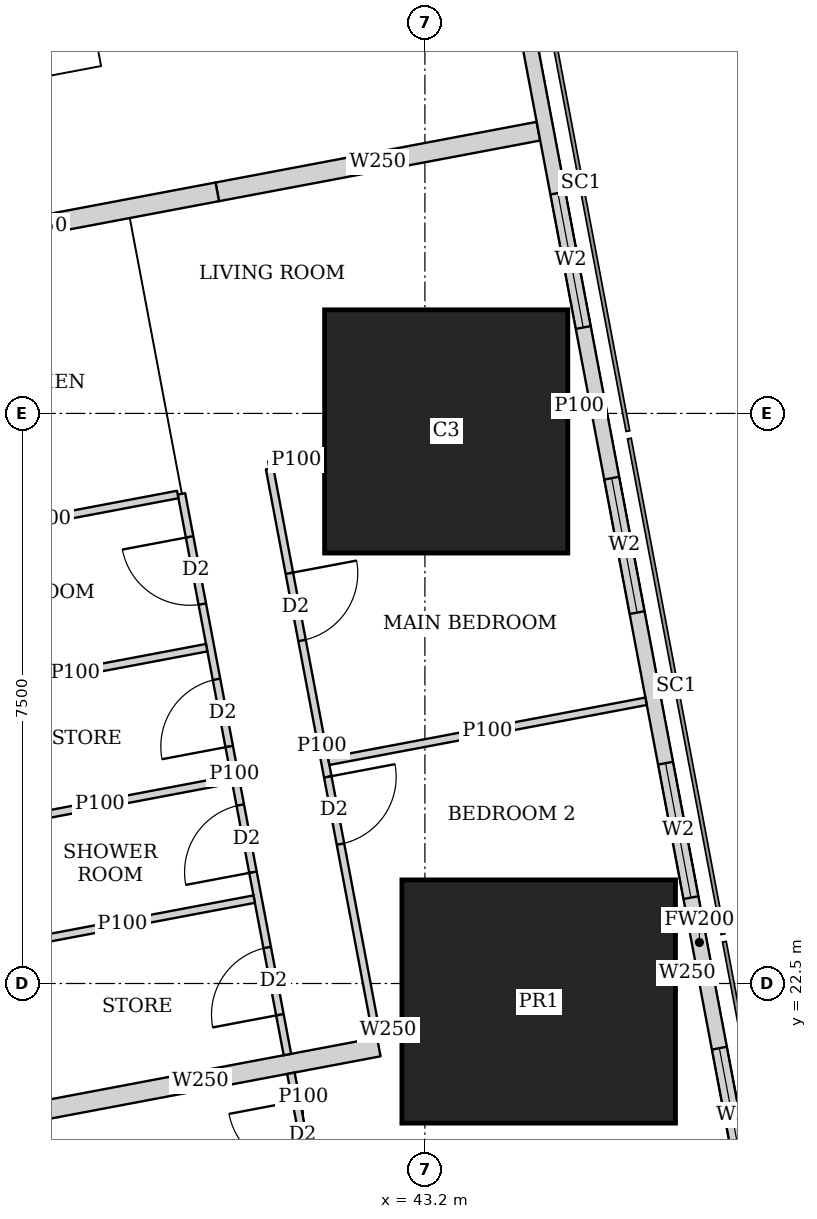
"""IFC4 building model, lengths in metres.
Left out: names, types, materials, properties, quantities, classifications, styles, units other than length and angle.
Written with IfcOpenShell. Run it as: python <this file> out.ifc"""

import sys

from ifc_helpers import new_model, si_unit, direction, frame, frame_2d, origin, origin_2d, place, context, subcontext, project, spatial, rectangle, extrude, element, fill, save


model = new_model("IFC4")
c1 = context("Model", 3, precision=1e-05, world=origin(), true_north=direction((0.0, 1.0)))
c2 = subcontext(c1, "Body", "Model", "MODEL_VIEW")
j1 = project(units=[si_unit("LENGTHUNIT", "METRE"), si_unit("PLANEANGLEUNIT", "RADIAN")], contexts=[c1])
p1 = place(None, origin())
s1 = spatial("IfcSite", under=j1, at=p1, CompositionType="ELEMENT")
p2 = place(p1, origin())
s2 = spatial("IfcBuilding", under=s1, at=p2, CompositionType="ELEMENT")
p3 = place(p2, frame((0.0, 0.0, 23.75)))
s3 = spatial("IfcBuildingStorey", under=s2, at=p3, CompositionType="ELEMENT", Elevation=23.75)
p4 = place(p3, frame((44.697, 22.263, 0.0), z_axis=(0.0, 0.0, 1.0), x_axis=(1.0, 0.0, 0.0)))
e1 = element("IfcColumn", 1, at=p4, inside=s3, PredefinedType="COLUMN", context=c2, shape_type="SweptSolid", body=[
    extrude(rectangle(XDim=3.6, YDim=3.2, at=origin_2d()), origin(), (0.0, 0.0, 1.0), 3.75),
])
p5 = place(p3, frame((43.48, 29.763, 0.0), z_axis=(0.0, 0.0, 1.0), x_axis=(1.0, 0.0, 0.0)))
e2 = element("IfcColumn", 2, at=p5, inside=s3, PredefinedType="COLUMN", context=c2, shape_type="SweptSolid", body=[
    extrude(rectangle(XDim=3.2, YDim=3.2, at=origin_2d()), origin(), (0.0, 0.0, 1.0), 3.75),
])
p6 = place(p3, frame((50.653, 2.703, 0.0), z_axis=(0.0, 0.0, 1.0), x_axis=(-0.185612026696, 0.982623109613, 0.0)))
e3 = element("IfcWall", 3, at=p6, inside=s3, PredefinedType="SOLIDWALL", context=c2, shape_type="SweptSolid", body=[
    extrude(rectangle(XDim=41.393, YDim=0.2, at=frame_2d((20.697, 0.0))), origin(), (0.0, 0.0, 1.0), 3.5),
])
p7 = place(p6, frame((1.633, 0.0, 0.9)))
e4 = element("IfcOpeningElement", 4, at=p7, cuts=e3, PredefinedType="OPENING", context=c2, shape_type="SweptSolid", body=[
    extrude(rectangle(XDim=1.8, YDim=1.5, at=frame_2d((0.9, 0.75))), frame((0.0, 0.11, 0.0), z_axis=(0.0, -1.0, 0.0), x_axis=(1.0, 0.0, 0.0)), (0.0, 0.0, 1.0), 0.22),
])
p8 = place(p6, frame((6.032, 0.0, 0.9)))
e5 = element("IfcOpeningElement", 5, at=p8, cuts=e3, PredefinedType="OPENING", context=c2, shape_type="SweptSolid", body=[
    extrude(rectangle(XDim=1.8, YDim=1.5, at=frame_2d((0.9, 0.75))), frame((0.0, 0.11, 0.0), z_axis=(0.0, -1.0, 0.0), x_axis=(1.0, 0.0, 0.0)), (0.0, 0.0, 1.0), 0.22),
])
p9 = place(p6, frame((9.848, 0.0, 0.9)))
e6 = element("IfcOpeningElement", 6, at=p9, cuts=e3, PredefinedType="OPENING", context=c2, shape_type="SweptSolid", body=[
    extrude(rectangle(XDim=1.8, YDim=1.5, at=frame_2d((0.9, 0.75))), frame((0.0, 0.11, 0.0), z_axis=(0.0, -1.0, 0.0), x_axis=(1.0, 0.0, 0.0)), (0.0, 0.0, 1.0), 0.22),
])
p10 = place(p6, frame((17.481, 0.0, 0.9)))
e7 = element("IfcOpeningElement", 7, at=p10, cuts=e3, PredefinedType="OPENING", context=c2, shape_type="SweptSolid", body=[
    extrude(rectangle(XDim=1.8, YDim=1.5, at=frame_2d((0.9, 0.75))), frame((0.0, 0.11, 0.0), z_axis=(0.0, -1.0, 0.0), x_axis=(1.0, 0.0, 0.0)), (0.0, 0.0, 1.0), 0.22),
])
p11 = place(p6, frame((21.297, 0.0, 0.9)))
e8 = element("IfcOpeningElement", 8, at=p11, cuts=e3, PredefinedType="OPENING", context=c2, shape_type="SweptSolid", body=[
    extrude(rectangle(XDim=1.8, YDim=1.5, at=frame_2d((0.9, 0.75))), frame((0.0, 0.11, 0.0), z_axis=(0.0, -1.0, 0.0), x_axis=(1.0, 0.0, 0.0)), (0.0, 0.0, 1.0), 0.22),
])
p12 = place(p6, frame((25.113, 0.0, 0.9)))
e9 = element("IfcOpeningElement", 9, at=p12, cuts=e3, PredefinedType="OPENING", context=c2, shape_type="SweptSolid", body=[
    extrude(rectangle(XDim=1.8, YDim=1.5, at=frame_2d((0.9, 0.75))), frame((0.0, 0.11, 0.0), z_axis=(0.0, -1.0, 0.0), x_axis=(1.0, 0.0, 0.0)), (0.0, 0.0, 1.0), 0.22),
])
p13 = place(p6, frame((28.93, 0.0, 0.9)))
e10 = element("IfcOpeningElement", 10, at=p13, cuts=e3, PredefinedType="OPENING", context=c2, shape_type="SweptSolid", body=[
    extrude(rectangle(XDim=1.8, YDim=1.5, at=frame_2d((0.9, 0.75))), frame((0.0, 0.11, 0.0), z_axis=(0.0, -1.0, 0.0), x_axis=(1.0, 0.0, 0.0)), (0.0, 0.0, 1.0), 0.22),
])
p14 = place(p6, frame((32.746, 0.0, 0.9)))
e11 = element("IfcOpeningElement", 11, at=p14, cuts=e3, PredefinedType="OPENING", context=c2, shape_type="SweptSolid", body=[
    extrude(rectangle(XDim=1.8, YDim=1.5, at=frame_2d((0.9, 0.75))), frame((0.0, 0.11, 0.0), z_axis=(0.0, -1.0, 0.0), x_axis=(1.0, 0.0, 0.0)), (0.0, 0.0, 1.0), 0.22),
])
p15 = place(p6, frame((36.481, 0.0, 0.9)))
e12 = element("IfcOpeningElement", 12, at=p15, cuts=e3, PredefinedType="OPENING", context=c2, shape_type="SweptSolid", body=[
    extrude(rectangle(XDim=1.8, YDim=1.5, at=frame_2d((0.9, 0.75))), frame((0.0, 0.11, 0.0), z_axis=(0.0, -1.0, 0.0), x_axis=(1.0, 0.0, 0.0)), (0.0, 0.0, 1.0), 0.22),
])
p16 = place(p3, frame((33.755, 42.325, 0.0), z_axis=(0.0, 0.0, 1.0), x_axis=(0.185611461091, -0.982623216453, 0.0)))
e13 = element("IfcWall", 13, at=p16, inside=s3, PredefinedType="SOLIDWALL", context=c2, shape_type="SweptSolid", body=[
    extrude(rectangle(XDim=40.241, YDim=0.15, at=frame_2d((20.121, 0.0))), origin(), (0.0, 0.0, 1.0), 2.5),
])
p17 = place(p16, frame((7.325, 0.0, 0.0)))
e14 = element("IfcOpeningElement", 14, at=p17, cuts=e13, PredefinedType="OPENING", context=c2, shape_type="SweptSolid", body=[
    extrude(rectangle(XDim=1.0, YDim=2.1, at=frame_2d((0.5, 1.05))), frame((0.0, 0.085, 0.0), z_axis=(0.0, -1.0, 0.0), x_axis=(1.0, 0.0, 0.0)), (0.0, 0.0, 1.0), 0.17),
])
p18 = place(p16, frame((11.902, 0.0, 0.0)))
e15 = element("IfcOpeningElement", 15, at=p18, cuts=e13, PredefinedType="OPENING", context=c2, shape_type="SweptSolid", body=[
    extrude(rectangle(XDim=1.0, YDim=2.1, at=frame_2d((0.5, 1.05))), frame((0.0, 0.085, 0.0), z_axis=(0.0, -1.0, 0.0), x_axis=(1.0, 0.0, 0.0)), (0.0, 0.0, 1.0), 0.17),
])
p19 = place(p16, frame((25.718, 0.0, 0.0)))
e16 = element("IfcOpeningElement", 16, at=p19, cuts=e13, PredefinedType="OPENING", context=c2, shape_type="SweptSolid", body=[
    extrude(rectangle(XDim=1.0, YDim=2.1, at=frame_2d((0.5, 1.05))), frame((0.0, 0.085, 0.0), z_axis=(0.0, -1.0, 0.0), x_axis=(1.0, 0.0, 0.0)), (0.0, 0.0, 1.0), 0.17),
])
p20 = place(p16, frame((31.788, 0.0, 0.0)))
e17 = element("IfcOpeningElement", 17, at=p20, cuts=e13, PredefinedType="OPENING", context=c2, shape_type="SweptSolid", body=[
    extrude(rectangle(XDim=1.0, YDim=2.1, at=frame_2d((0.5, 1.05))), frame((0.0, 0.085, 0.0), z_axis=(0.0, -1.0, 0.0), x_axis=(1.0, 0.0, 0.0)), (0.0, 0.0, 1.0), 0.17),
])
p21 = place(p3, frame((41.157, 29.273, 0.0), z_axis=(0.0, 0.0, 1.0), x_axis=(0.18542464283, -0.982658486877, 0.0)))
e18 = element("IfcWall", 18, at=p21, inside=s3, PredefinedType="PARTITIONING", context=c2, shape_type="SweptSolid", body=[
    extrude(rectangle(XDim=7.421, YDim=0.1, at=frame_2d((3.71, 0.0))), origin(), (0.0, 0.0, 1.0), 2.5),
])
p22 = place(p21, frame((1.4, 0.0, 0.0)))
e19 = element("IfcOpeningElement", 19, at=p22, cuts=e18, PredefinedType="OPENING", context=c2, shape_type="SweptSolid", body=[
    extrude(rectangle(XDim=0.9, YDim=2.1, at=frame_2d((0.45, 1.05))), frame((0.0, 0.06, 0.0), z_axis=(0.0, -1.0, 0.0), x_axis=(1.0, 0.0, 0.0)), (0.0, 0.0, 1.0), 0.12),
])
p23 = place(p21, frame((4.126, 0.0, 0.0)))
e20 = element("IfcOpeningElement", 20, at=p23, cuts=e18, PredefinedType="OPENING", context=c2, shape_type="SweptSolid", body=[
    extrude(rectangle(XDim=0.9, YDim=2.1, at=frame_2d((0.45, 1.05))), frame((0.0, 0.06, 0.0), z_axis=(0.0, -1.0, 0.0), x_axis=(1.0, 0.0, 0.0)), (0.0, 0.0, 1.0), 0.12),
])
p24 = place(p3, frame((39.997, 28.942, 0.0), z_axis=(0.0, 0.0, 1.0), x_axis=(0.185686318797, -0.982609073341, 0.0)))
e21 = element("IfcWall", 21, at=p24, inside=s3, PredefinedType="PARTITIONING", context=c2, shape_type="SweptSolid", body=[
    extrude(rectangle(XDim=7.508, YDim=0.1, at=frame_2d((3.754, 0.0))), origin(), (0.0, 0.0, 1.0), 2.5),
])
p25 = place(p24, frame((0.576, 0.0, 0.0)))
e22 = element("IfcOpeningElement", 22, at=p25, cuts=e21, PredefinedType="OPENING", context=c2, shape_type="SweptSolid", body=[
    extrude(rectangle(XDim=0.9, YDim=2.1, at=frame_2d((0.45, 1.05))), frame((0.0, 0.06, 0.0), z_axis=(0.0, -1.0, 0.0), x_axis=(1.0, 0.0, 0.0)), (0.0, 0.0, 1.0), 0.12),
])
p26 = place(p24, frame((4.166, 0.0, 0.0)))
e23 = element("IfcOpeningElement", 23, at=p26, cuts=e21, PredefinedType="OPENING", context=c2, shape_type="SweptSolid", body=[
    extrude(rectangle(XDim=0.9, YDim=2.1, at=frame_2d((0.45, 1.05))), frame((0.0, 0.06, 0.0), z_axis=(0.0, -1.0, 0.0), x_axis=(1.0, 0.0, 0.0)), (0.0, 0.0, 1.0), 0.12),
])
p27 = place(p24, frame((2.483, 0.0, 0.0)))
e24 = element("IfcOpeningElement", 24, at=p27, cuts=e21, PredefinedType="OPENING", context=c2, shape_type="SweptSolid", body=[
    extrude(rectangle(XDim=0.9, YDim=2.1, at=frame_2d((0.45, 1.05))), frame((0.0, 0.06, 0.0), z_axis=(0.0, -1.0, 0.0), x_axis=(1.0, 0.0, 0.0)), (0.0, 0.0, 1.0), 0.12),
])
p28 = place(p24, frame((6.074, 0.0, 0.0)))
e25 = element("IfcOpeningElement", 25, at=p28, cuts=e21, PredefinedType="OPENING", context=c2, shape_type="SweptSolid", body=[
    extrude(rectangle(XDim=0.9, YDim=2.1, at=frame_2d((0.45, 1.05))), frame((0.0, 0.06, 0.0), z_axis=(0.0, -1.0, 0.0), x_axis=(1.0, 0.0, 0.0)), (0.0, 0.0, 1.0), 0.12),
])
p29 = place(p3, frame((45.372, 30.121, 0.0), z_axis=(0.0, 0.0, 1.0), x_axis=(-0.982024635814, -0.188752787143, 0.0)))
e26 = element("IfcWall", 26, at=p29, inside=s3, PredefinedType="PARTITIONING", context=c2, shape_type="SweptSolid", body=[
    extrude(rectangle(XDim=0.287, YDim=0.1, at=frame_2d((0.144, 0.0))), origin(), (0.0, 0.0, 1.0), 3.5),
])
p30 = place(p3, frame((41.87, 29.459, 0.0), z_axis=(0.0, 0.0, 1.0), x_axis=(-0.982532562822, -0.186090738603, 0.0)))
e27 = element("IfcWall", 27, at=p30, inside=s3, PredefinedType="PARTITIONING", context=c2, shape_type="SweptSolid", body=[
    extrude(rectangle(XDim=0.736, YDim=0.1, at=frame_2d((0.368, 0.0))), origin(), (0.0, 0.0, 1.0), 2.5),
])
p31 = place(p3, frame((46.11, 26.213, 0.0), z_axis=(0.0, 0.0, 1.0), x_axis=(-0.982623519589, -0.185609856287, 0.0)))
e28 = element("IfcWall", 28, at=p31, inside=s3, PredefinedType="PARTITIONING", context=c2, shape_type="SweptSolid", body=[
    extrude(rectangle(XDim=4.25, YDim=0.1, at=frame_2d((2.125, 0.0))), origin(), (0.0, 0.0, 1.0), 2.05),
])
for number, where, z_axis, x_axis in (
    (29, (39.948, 28.933, 0.0), (0.0, 0.0, 1.0), (-0.983, -0.186, 0.0)),
    (30, (40.656, 25.183, 0.0), (0.0, 0.0, 1.0), (-0.983, -0.186, 0.0)),
):
    element("IfcWall", number, at=place(p3, frame(where, z_axis=z_axis, x_axis=x_axis)), inside=s3, PredefinedType="PARTITIONING", context=c2, shape_type="SweptSolid", body=[
        extrude(rectangle(XDim=3.524, YDim=0.1, at=frame_2d((1.762, 0.0))), origin(), (0.0, 0.0, 1.0), 3.5),
    ])
p32 = place(p3, frame((40.329, 26.918, 0.0), z_axis=(0.0, 0.0, 1.0), x_axis=(-0.982638553676, -0.185530247748, 0.0)))
e31 = element("IfcWall", 31, at=p32, inside=s3, PredefinedType="PARTITIONING", context=c2, shape_type="SweptSolid", body=[
    extrude(rectangle(XDim=3.525, YDim=0.1, at=frame_2d((1.763, 0.0))), origin(), (0.0, 0.0, 1.0), 3.5),
])
p33 = place(p3, frame((40.954, 23.61, 0.0), z_axis=(0.0, 0.0, 1.0), x_axis=(-0.982638553676, -0.185530247748, 0.0)))
e32 = element("IfcWall", 32, at=p33, inside=s3, PredefinedType="PARTITIONING", context=c2, shape_type="SweptSolid", body=[
    extrude(rectangle(XDim=3.525, YDim=0.1, at=frame_2d((1.763, 0.0))), origin(), (0.0, 0.0, 1.0), 2.5),
])
p34 = place(p3, frame((44.693, 33.713, 0.0), z_axis=(0.0, 0.0, 1.0), x_axis=(-0.982633535512, -0.185556823879, 0.0)))
e33 = element("IfcWall", 33, at=p34, inside=s3, PredefinedType="SOLIDWALL", context=c2, shape_type="SweptSolid", body=[
    extrude(rectangle(XDim=4.3, YDim=0.25, at=frame_2d((2.15, 0.0))), origin(), (0.0, 0.0, 1.0), 2.05),
])
p35 = place(p3, frame((40.468, 32.915, 0.0), z_axis=(0.0, 0.0, 1.0), x_axis=(-0.982635807605, -0.185544791394, 0.0)))
e34 = element("IfcWall", 34, at=p35, inside=s3, PredefinedType="SOLIDWALL", context=c2, shape_type="SweptSolid", body=[
    extrude(rectangle(XDim=4.775, YDim=0.25, at=frame_2d((2.388, 0.0))), origin(), (0.0, 0.0, 1.0), 3.5),
])
p36 = place(p3, frame((41.437, 21.319, 0.0), z_axis=(0.0, 0.0, 1.0), x_axis=(0.185783379659, -0.98259072652, 0.0)))
e35 = element("IfcWall", 35, at=p36, inside=s3, PredefinedType="PARTITIONING", context=c2, shape_type="SweptSolid", body=[
    extrude(rectangle(XDim=1.765, YDim=0.1, at=frame_2d((0.882, 0.0))), origin(), (0.0, 0.0, 1.0), 3.5),
])
p37 = place(p36, frame((0.374, 0.0, 0.0)))
e36 = element("IfcOpeningElement", 36, at=p37, cuts=e35, PredefinedType="OPENING", context=c2, shape_type="SweptSolid", body=[
    extrude(rectangle(XDim=0.9, YDim=2.1, at=frame_2d((0.45, 1.05))), frame((0.0, 0.06, 0.0), z_axis=(0.0, -1.0, 0.0), x_axis=(1.0, 0.0, 0.0)), (0.0, 0.0, 1.0), 0.12),
])
p38 = place(p3, frame((46.782, 22.657, 0.0), z_axis=(0.0, 0.0, 1.0), x_axis=(-0.982104607121, -0.188336243648, 0.0)))
e37 = element("IfcWall", 37, at=p38, inside=s3, PredefinedType="SOLIDWALL", context=c2, shape_type="SweptSolid", body=[
    extrude(rectangle(XDim=0.266, YDim=0.25, at=frame_2d((0.133, 0.0))), origin(), (0.0, 0.0, 1.0), 3.5),
])
p39 = place(p3, frame((42.873, 21.918, 0.0), z_axis=(0.0, 0.0, 1.0), x_axis=(-0.982431406936, -0.186624035603, 0.0)))
e38 = element("IfcWall", 38, at=p39, inside=s3, PredefinedType="SOLIDWALL", context=c2, shape_type="SweptSolid", body=[
    extrude(rectangle(XDim=0.322, YDim=0.25, at=frame_2d((0.161, 0.0))), origin(), (0.0, 0.0, 1.0), 2.5),
])
p40 = place(p3, frame((42.593, 21.665, 0.0), z_axis=(0.0, 0.0, 1.0), x_axis=(-0.982635807605, -0.185544791394, 0.0)))
e39 = element("IfcWall", 39, at=p40, inside=s3, PredefinedType="SOLIDWALL", context=c2, shape_type="SweptSolid", body=[
    extrude(rectangle(XDim=4.775, YDim=0.25, at=frame_2d((2.388, 0.0))), origin(), (0.0, 0.0, 1.0), 2.5),
])
p41 = place(p10, origin())
e40 = element("IfcWindow", 40, at=p41, inside=s3, PartitioningType="SINGLE_PANEL", PredefinedType="WINDOW", context=c2, shape_type="SweptSolid", body=[
    extrude(rectangle(XDim=1.8, YDim=1.5, at=frame_2d((0.9, 0.75))), frame((0.0, 0.03, 0.0), z_axis=(0.0, -1.0, 0.0), x_axis=(1.0, 0.0, 0.0)), (0.0, 0.0, 1.0), 0.06),
])
fill(e7, e40)
p42 = place(p11, origin())
e41 = element("IfcWindow", 41, at=p42, inside=s3, PartitioningType="SINGLE_PANEL", PredefinedType="WINDOW", context=c2, shape_type="SweptSolid", body=[
    extrude(rectangle(XDim=1.8, YDim=1.5, at=frame_2d((0.9, 0.75))), frame((0.0, 0.03, 0.0), z_axis=(0.0, -1.0, 0.0), x_axis=(1.0, 0.0, 0.0)), (0.0, 0.0, 1.0), 0.06),
])
fill(e8, e41)
p43 = place(p12, origin())
e42 = element("IfcWindow", 42, at=p43, inside=s3, PartitioningType="SINGLE_PANEL", PredefinedType="WINDOW", context=c2, shape_type="SweptSolid", body=[
    extrude(rectangle(XDim=1.8, YDim=1.5, at=frame_2d((0.9, 0.75))), frame((0.0, 0.03, 0.0), z_axis=(0.0, -1.0, 0.0), x_axis=(1.0, 0.0, 0.0)), (0.0, 0.0, 1.0), 0.06),
])
fill(e9, e42)
p44 = place(p13, origin())
e43 = element("IfcWindow", 43, at=p44, inside=s3, PartitioningType="SINGLE_PANEL", PredefinedType="WINDOW", context=c2, shape_type="SweptSolid", body=[
    extrude(rectangle(XDim=1.8, YDim=1.5, at=frame_2d((0.9, 0.75))), frame((0.0, 0.03, 0.0), z_axis=(0.0, -1.0, 0.0), x_axis=(1.0, 0.0, 0.0)), (0.0, 0.0, 1.0), 0.06),
])
fill(e10, e43)
p45 = place(p22, origin())
e44 = element("IfcDoor", 44, at=p45, inside=s3, OperationType="SINGLE_SWING_LEFT", PredefinedType="DOOR", context=c2, shape_type="SweptSolid", body=[
    extrude(rectangle(XDim=0.9, YDim=2.1, at=frame_2d((0.45, 1.05))), frame((0.0, 0.025, 0.0), z_axis=(0.0, -1.0, 0.0), x_axis=(1.0, 0.0, 0.0)), (0.0, 0.0, 1.0), 0.05),
])
fill(e19, e44)
p46 = place(p23, origin())
e45 = element("IfcDoor", 45, at=p46, inside=s3, OperationType="SINGLE_SWING_LEFT", PredefinedType="DOOR", context=c2, shape_type="SweptSolid", body=[
    extrude(rectangle(XDim=0.9, YDim=2.1, at=frame_2d((0.45, 1.05))), frame((0.0, 0.025, 0.0), z_axis=(0.0, -1.0, 0.0), x_axis=(1.0, 0.0, 0.0)), (0.0, 0.0, 1.0), 0.05),
])
fill(e20, e45)
p47 = place(p25, origin())
e46 = element("IfcDoor", 46, at=p47, inside=s3, OperationType="SINGLE_SWING_RIGHT", PredefinedType="DOOR", context=c2, shape_type="SweptSolid", body=[
    extrude(rectangle(XDim=0.9, YDim=2.1, at=frame_2d((0.45, 1.05))), frame((0.0, 0.025, 0.0), z_axis=(0.0, -1.0, 0.0), x_axis=(1.0, 0.0, 0.0)), (0.0, 0.0, 1.0), 0.05),
])
fill(e22, e46)
p48 = place(p26, origin())
e47 = element("IfcDoor", 47, at=p48, inside=s3, OperationType="SINGLE_SWING_LEFT", PredefinedType="DOOR", context=c2, shape_type="SweptSolid", body=[
    extrude(rectangle(XDim=0.9, YDim=2.1, at=frame_2d((0.45, 1.05))), frame((0.0, 0.025, 0.0), z_axis=(0.0, -1.0, 0.0), x_axis=(1.0, 0.0, 0.0)), (0.0, 0.0, 1.0), 0.05),
])
fill(e23, e47)
p49 = place(p27, origin())
e48 = element("IfcDoor", 48, at=p49, inside=s3, OperationType="SINGLE_SWING_LEFT", PredefinedType="DOOR", context=c2, shape_type="SweptSolid", body=[
    extrude(rectangle(XDim=0.9, YDim=2.1, at=frame_2d((0.45, 1.05))), frame((0.0, 0.025, 0.0), z_axis=(0.0, -1.0, 0.0), x_axis=(1.0, 0.0, 0.0)), (0.0, 0.0, 1.0), 0.05),
])
fill(e24, e48)
p50 = place(p28, origin())
e49 = element("IfcDoor", 49, at=p50, inside=s3, OperationType="SINGLE_SWING_LEFT", PredefinedType="DOOR", context=c2, shape_type="SweptSolid", body=[
    extrude(rectangle(XDim=0.9, YDim=2.1, at=frame_2d((0.45, 1.05))), frame((0.0, 0.025, 0.0), z_axis=(0.0, -1.0, 0.0), x_axis=(1.0, 0.0, 0.0)), (0.0, 0.0, 1.0), 0.05),
])
fill(e25, e49)
p51 = place(p37, origin())
e50 = element("IfcDoor", 50, at=p51, inside=s3, OperationType="SINGLE_SWING_RIGHT", PredefinedType="DOOR", context=c2, shape_type="SweptSolid", body=[
    extrude(rectangle(XDim=0.9, YDim=2.1, at=frame_2d((0.45, 1.05))), frame((0.0, 0.025, 0.0), z_axis=(0.0, -1.0, 0.0), x_axis=(1.0, 0.0, 0.0)), (0.0, 0.0, 1.0), 0.05),
])
fill(e36, e50)
save(model, sys.argv[1])
